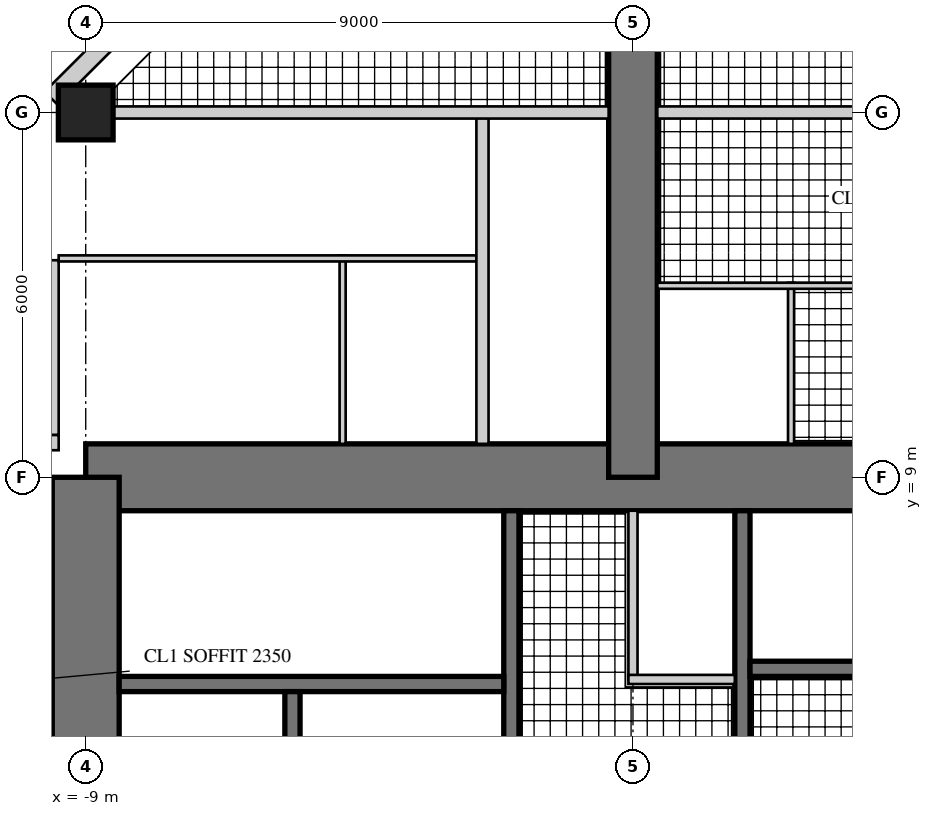
"""IFC4 building model, lengths in metres.
Left out: names, types, materials, properties, quantities, classifications, styles, units other than length and angle.
Written with IfcOpenShell. Run it as: python <this file> out.ifc"""

import sys

from ifc_helpers import new_model, si_unit, direction, frame, frame_2d, origin, origin_2d, place, context, subcontext, project, spatial, rectangle, hollow_rectangle, extrude, element, fill, save


model = new_model("IFC4")
c1 = context("Model", 3, precision=1e-05, world=origin(), true_north=direction((0.0, 1.0)))
c2 = subcontext(c1, "Body", "Model", "MODEL_VIEW")
j1 = project(units=[si_unit("LENGTHUNIT", "METRE"), si_unit("PLANEANGLEUNIT", "RADIAN")], contexts=[c1])
p1 = place(None, origin())
s1 = spatial("IfcSite", under=j1, at=p1, CompositionType="ELEMENT")
p2 = place(p1, origin())
s2 = spatial("IfcBuilding", under=s1, at=p2, CompositionType="ELEMENT")
p3 = place(p2, frame((0.0, 0.0, 179.7)))
s3 = spatial("IfcBuildingStorey", under=s2, at=p3, CompositionType="ELEMENT", Elevation=179.7)
p4 = place(p3, frame((9.0, 9.0, 0.0), z_axis=(0.0, 0.0, 1.0), x_axis=(-1.0, 0.0, 0.0)))
e1 = element("IfcWall", 1, at=p4, inside=s3, PredefinedType="SHEAR", context=c2, shape_type="SweptSolid", body=[
    extrude(rectangle(XDim=18.0, YDim=1.1, at=frame_2d((9.0, 0.0))), origin(), (0.0, 0.0, 1.0), 3.4),
])
p5 = place(p4, frame((9.8, 0.0, 0.0)))
e2 = element("IfcOpeningElement", 2, at=p5, cuts=e1, PredefinedType="OPENING", context=c2, shape_type="SweptSolid", body=[
    extrude(rectangle(XDim=1.0, YDim=2.4, at=frame_2d((0.5, 1.2))), frame((0.0, 0.56, 0.0), z_axis=(0.0, -1.0, 0.0), x_axis=(1.0, 0.0, 0.0)), (0.0, 0.0, 1.0), 1.12),
])
p6 = place(p3, frame((-9.0, 9.0, 0.0), z_axis=(0.0, 0.0, 1.0), x_axis=(0.0, -1.0, 0.0)))
e3 = element("IfcWall", 3, at=p6, inside=s3, PredefinedType="SHEAR", context=c2, shape_type="SweptSolid", body=[
    extrude(rectangle(XDim=18.0, YDim=1.1, at=frame_2d((9.0, 0.0))), origin(), (0.0, 0.0, 1.0), 3.4),
])
p7 = place(p6, frame((9.8, 0.0, 0.0)))
e4 = element("IfcOpeningElement", 4, at=p7, cuts=e3, PredefinedType="OPENING", context=c2, shape_type="SweptSolid", body=[
    extrude(rectangle(XDim=1.0, YDim=2.4, at=frame_2d((0.5, 1.2))), frame((0.0, 0.56, 0.0), z_axis=(0.0, -1.0, 0.0), x_axis=(1.0, 0.0, 0.0)), (0.0, 0.0, 1.0), 1.12),
])
p8 = place(p3, frame((1.8, 1.875, 0.0), z_axis=(0.0, 0.0, 1.0), x_axis=(0.0, 1.0, 0.0)))
e5 = element("IfcWall", 5, at=p8, inside=s3, PredefinedType="SHEAR", context=c2, shape_type="SweptSolid", body=[
    extrude(rectangle(XDim=6.575, YDim=0.25, at=frame_2d((3.288, 0.0))), origin(), (0.0, 0.0, 1.0), 3.4),
])
p9 = place(p8, frame((1.875, 0.0, 0.0)))
e6 = element("IfcOpeningElement", 6, at=p9, cuts=e5, PredefinedType="OPENING", context=c2, shape_type="SweptSolid", body=[
    extrude(rectangle(XDim=1.6, YDim=2.4, at=frame_2d((0.8, 1.2))), frame((0.0, 0.135, 0.0), z_axis=(0.0, -1.0, 0.0), x_axis=(1.0, 0.0, 0.0)), (0.0, 0.0, 1.0), 0.27),
])
p10 = place(p3, frame((1.925, 5.85, 0.0), z_axis=(0.0, 0.0, 1.0), x_axis=(1.0, 0.0, 0.0)))
e7 = element("IfcWall", 7, at=p10, inside=s3, PredefinedType="SHEAR", context=c2, shape_type="SweptSolid", body=[
    extrude(rectangle(XDim=6.525, YDim=0.25, at=frame_2d((3.262, 0.0))), origin(), (0.0, 0.0, 1.0), 3.4),
])
p11 = place(p10, frame((0.521, 0.0, 0.0)))
e8 = element("IfcOpeningElement", 8, at=p11, cuts=e7, PredefinedType="OPENING", context=c2, shape_type="SweptSolid", body=[
    extrude(rectangle(XDim=1.0, YDim=2.1, at=frame_2d((0.5, 1.05))), frame((0.0, 0.135, 0.0), z_axis=(0.0, -1.0, 0.0), x_axis=(1.0, 0.0, 0.0)), (0.0, 0.0, 1.0), 0.27),
])
p12 = place(p3, frame((-2.0, 1.675, 0.0), z_axis=(0.0, 0.0, 1.0), x_axis=(0.0, 1.0, 0.0)))
e9 = element("IfcWall", 9, at=p12, inside=s3, PredefinedType="SHEAR", context=c2, shape_type="SweptSolid", body=[
    extrude(rectangle(XDim=6.775, YDim=0.25, at=frame_2d((3.387, 0.0))), origin(), (0.0, 0.0, 1.0), 3.4),
])
p13 = place(p12, frame((0.725, 0.0, 0.0)))
e10 = element("IfcOpeningElement", 10, at=p13, cuts=e9, PredefinedType="OPENING", context=c2, shape_type="SweptSolid", body=[
    extrude(rectangle(XDim=1.0, YDim=2.1, at=frame_2d((0.5, 1.05))), frame((0.0, 0.135, 0.0), z_axis=(0.0, -1.0, 0.0), x_axis=(1.0, 0.0, 0.0)), (0.0, 0.0, 1.0), 0.27),
])
p14 = place(p3, frame((-2.125, 5.6, 0.0), z_axis=(0.0, 0.0, 1.0), x_axis=(-1.0, 0.0, 0.0)))
e11 = element("IfcWall", 11, at=p14, inside=s3, PredefinedType="SHEAR", context=c2, shape_type="SweptSolid", body=[
    extrude(rectangle(XDim=6.325, YDim=0.25, at=frame_2d((3.163, 0.0))), origin(), (0.0, 0.0, 1.0), 3.4),
])
p15 = place(p14, frame((0.175, 0.0, 0.0)))
e12 = element("IfcOpeningElement", 12, at=p15, cuts=e11, PredefinedType="OPENING", context=c2, shape_type="SweptSolid", body=[
    extrude(rectangle(XDim=1.0, YDim=2.1, at=frame_2d((0.5, 1.05))), frame((0.0, 0.135, 0.0), z_axis=(0.0, -1.0, 0.0), x_axis=(1.0, 0.0, 0.0)), (0.0, 0.0, 1.0), 0.27),
])
p16 = place(p3, frame((-5.6, 1.925, 0.0), z_axis=(0.0, 0.0, 1.0), x_axis=(0.0, 1.0, 0.0)))
e13 = element("IfcWall", 13, at=p16, inside=s3, PredefinedType="SHEAR", context=c2, shape_type="SweptSolid", body=[
    extrude(rectangle(XDim=3.55, YDim=0.25, at=frame_2d((1.775, 0.0))), origin(), (0.0, 0.0, 1.0), 3.4),
])
p17 = place(p16, frame((1.525, 0.0, 0.0)))
e14 = element("IfcOpeningElement", 14, at=p17, cuts=e13, PredefinedType="OPENING", context=c2, shape_type="SweptSolid", body=[
    extrude(rectangle(XDim=1.1, YDim=2.2, at=frame_2d((0.55, 1.1))), frame((0.0, 0.135, 0.0), z_axis=(0.0, -1.0, 0.0), x_axis=(1.0, 0.0, 0.0)), (0.0, 0.0, 1.0), 0.27),
])
p18 = place(p16, frame((0.075, 0.0, 0.0)))
e15 = element("IfcOpeningElement", 15, at=p18, cuts=e13, PredefinedType="OPENING", context=c2, shape_type="SweptSolid", body=[
    extrude(rectangle(XDim=0.8, YDim=2.1, at=frame_2d((0.4, 1.05))), frame((0.0, 0.135, 0.0), z_axis=(0.0, -1.0, 0.0), x_axis=(1.0, 0.0, 0.0)), (0.0, 0.0, 1.0), 0.27),
])
p19 = place(p3, frame((0.0, 9.0, 0.0), z_axis=(0.0, 0.0, 1.0), x_axis=(0.0, 1.0, 0.0)))
e16 = element("IfcWall", 16, at=p19, inside=s3, PredefinedType="SHEAR", context=c2, shape_type="SweptSolid", body=[
    extrude(rectangle(XDim=9.0, YDim=0.8, at=frame_2d((4.5, 0.0))), origin(), (0.0, 0.0, 1.0), 3.4),
])
p20 = place(p19, frame((3.95, 0.0, 0.0)))
e17 = element("IfcOpeningElement", 17, at=p20, cuts=e16, PredefinedType="OPENING", context=c2, shape_type="SweptSolid", body=[
    extrude(rectangle(XDim=1.0, YDim=2.15, at=frame_2d((0.5, 1.075))), frame((0.0, 0.41, 0.0), z_axis=(0.0, -1.0, 0.0), x_axis=(1.0, 0.0, 0.0)), (0.0, 0.0, 1.0), 0.82),
])
p21 = place(p19, frame((7.0, 0.0, 0.0)))
e18 = element("IfcOpeningElement", 18, at=p21, cuts=e16, PredefinedType="OPENING", context=c2, shape_type="SweptSolid", body=[
    extrude(rectangle(XDim=1.0, YDim=2.2, at=frame_2d((0.5, 1.1))), frame((0.0, 0.41, 0.0), z_axis=(0.0, -1.0, 0.0), x_axis=(1.0, 0.0, 0.0)), (0.0, 0.0, 1.0), 0.82),
])
p22 = place(p3, frame((-9.0, 15.0, 0.0), z_axis=(0.0, 0.0, 1.0), x_axis=(1.0, 0.0, 0.0)))
e19 = element("IfcColumn", 19, at=p22, inside=s3, PredefinedType="COLUMN", context=c2, shape_type="SweptSolid", body=[
    extrude(rectangle(XDim=0.9, YDim=0.9, at=origin_2d()), origin(), (0.0, 0.0, 1.0), 3.4),
])
p23 = place(p3, frame((-6.406, 18.4, 0.0), z_axis=(0.0, 0.0, 1.0), x_axis=(-0.707134062067, -0.707079499254, 0.0)))
e20 = element("IfcWall", 20, at=p23, inside=s3, PredefinedType="SOLIDWALL", context=c2, shape_type="SweptSolid", body=[
    extrude(rectangle(XDim=4.475, YDim=0.3, at=frame_2d((2.237, 0.0))), origin(), (0.0, 0.0, 1.0), 3.22),
])
p24 = place(p23, frame((1.787, 0.0, 0.3)))
e21 = element("IfcOpeningElement", 21, at=p24, cuts=e20, PredefinedType="OPENING", context=c2, shape_type="SweptSolid", body=[
    extrude(rectangle(XDim=0.9, YDim=2.4, at=frame_2d((0.45, 1.2))), frame((0.0, 0.16, 0.0), z_axis=(0.0, -1.0, 0.0), x_axis=(1.0, 0.0, 0.0)), (0.0, 0.0, 1.0), 0.32),
])
p25 = place(p3, frame((-9.57, 12.57, 0.0), z_axis=(0.0, 0.0, 1.0), x_axis=(0.0, -1.0, 0.0)))
e22 = element("IfcWall", 22, at=p25, inside=s3, PredefinedType="SOLIDWALL", context=c2, shape_type="SweptSolid", body=[
    extrude(rectangle(XDim=2.875, YDim=0.25, at=frame_2d((1.438, 0.0))), origin(), (0.0, 0.0, 1.0), 3.22),
])
p26 = place(p25, frame((0.6, 0.0, 0.0)))
e23 = element("IfcOpeningElement", 23, at=p26, cuts=e22, PredefinedType="OPENING", context=c2, shape_type="SweptSolid", body=[
    extrude(rectangle(XDim=1.0, YDim=2.2, at=frame_2d((0.5, 1.1))), frame((0.0, 0.135, 0.0), z_axis=(0.0, -1.0, 0.0), x_axis=(1.0, 0.0, 0.0)), (0.0, 0.0, 1.0), 0.27),
])
p27 = place(p3, frame((-9.445, 9.57, 0.0), z_axis=(0.0, 0.0, 1.0), x_axis=(-1.0, 0.0, 0.0)))
e24 = element("IfcWall", 24, at=p27, inside=s3, PredefinedType="SOLIDWALL", context=c2, shape_type="SweptSolid", body=[
    extrude(rectangle(XDim=3.125, YDim=0.25, at=frame_2d((1.562, 0.0))), origin(), (0.0, 0.0, 1.0), 3.22),
])
p28 = place(p27, frame((0.6, 0.0, 0.0)))
e25 = element("IfcOpeningElement", 25, at=p28, cuts=e24, PredefinedType="OPENING", context=c2, shape_type="SweptSolid", body=[
    extrude(rectangle(XDim=1.0, YDim=2.2, at=frame_2d((0.5, 1.1))), frame((0.0, 0.135, 0.0), z_axis=(0.0, -1.0, 0.0), x_axis=(1.0, 0.0, 0.0)), (0.0, 0.0, 1.0), 0.27),
])
p29 = place(p3, frame((0.0, 5.675, 0.0), z_axis=(0.0, 0.0, 1.0), x_axis=(0.0, 1.0, 0.0)))
e26 = element("IfcWall", 26, at=p29, inside=s3, PredefinedType="PARTITIONING", context=c2, shape_type="SweptSolid", body=[
    extrude(rectangle(XDim=2.775, YDim=0.15, at=frame_2d((1.387, 0.0))), origin(), (0.0, 0.0, 1.0), 3.22),
])
p30 = place(p29, frame((0.4, 0.0, 0.0)))
e27 = element("IfcOpeningElement", 27, at=p30, cuts=e26, PredefinedType="OPENING", context=c2, shape_type="SweptSolid", body=[
    extrude(rectangle(XDim=1.0, YDim=2.1, at=frame_2d((0.5, 1.05))), frame((0.0, 0.085, 0.0), z_axis=(0.0, -1.0, 0.0), x_axis=(1.0, 0.0, 0.0)), (0.0, 0.0, 1.0), 0.17),
])
p31 = place(p3, frame((1.675, 5.675, 0.0), z_axis=(0.0, 0.0, 1.0), x_axis=(-1.0, 0.0, 0.0)))
e28 = element("IfcWall", 28, at=p31, inside=s3, PredefinedType="PARTITIONING", context=c2, shape_type="SweptSolid", body=[
    extrude(rectangle(XDim=1.75, YDim=0.15, at=frame_2d((0.875, 0.0))), origin(), (0.0, 0.0, 1.0), 3.22),
])
p32 = place(p3, frame((-4.775, 9.55, 0.0), z_axis=(0.0, 0.0, 1.0), x_axis=(0.0, 1.0, 0.0)))
e29 = element("IfcWall", 29, at=p32, inside=s3, PredefinedType="PARTITIONING", context=c2, shape_type="SweptSolid", body=[
    extrude(rectangle(XDim=3.1, YDim=0.1, at=frame_2d((1.55, 0.0))), origin(), (0.0, 0.0, 1.0), 3.22),
])
p33 = place(p3, frame((-2.575, 12.6, 0.0), z_axis=(0.0, 0.0, 1.0), x_axis=(-1.0, 0.0, 0.0)))
e30 = element("IfcWall", 30, at=p33, inside=s3, PredefinedType="PARTITIONING", context=c2, shape_type="SweptSolid", body=[
    extrude(rectangle(XDim=6.87, YDim=0.1, at=frame_2d((3.435, 0.0))), origin(), (0.0, 0.0, 1.0), 3.22),
])
p34 = place(p33, frame((0.55, 0.0, 0.0)))
e31 = element("IfcOpeningElement", 31, at=p34, cuts=e30, PredefinedType="OPENING", context=c2, shape_type="SweptSolid", body=[
    extrude(rectangle(XDim=0.9, YDim=2.1, at=frame_2d((0.45, 1.05))), frame((0.0, 0.06, 0.0), z_axis=(0.0, -1.0, 0.0), x_axis=(1.0, 0.0, 0.0)), (0.0, 0.0, 1.0), 0.12),
])
p35 = place(p33, frame((2.65, 0.0, 0.0)))
e32 = element("IfcOpeningElement", 32, at=p35, cuts=e30, PredefinedType="OPENING", context=c2, shape_type="SweptSolid", body=[
    extrude(rectangle(XDim=0.9, YDim=2.1, at=frame_2d((0.45, 1.05))), frame((0.0, 0.06, 0.0), z_axis=(0.0, -1.0, 0.0), x_axis=(1.0, 0.0, 0.0)), (0.0, 0.0, 1.0), 0.12),
])
p36 = place(p3, frame((2.6, 9.55, 0.0), z_axis=(0.0, 0.0, 1.0), x_axis=(0.0, 1.0, 0.0)))
e33 = element("IfcWall", 33, at=p36, inside=s3, PredefinedType="PARTITIONING", context=c2, shape_type="SweptSolid", body=[
    extrude(rectangle(XDim=2.65, YDim=0.1, at=frame_2d((1.325, 0.0))), origin(), (0.0, 0.0, 1.0), 3.22),
])
p37 = place(p3, frame((9.445, 12.15, 0.0), z_axis=(0.0, 0.0, 1.0), x_axis=(-1.0, 0.0, 0.0)))
e34 = element("IfcWall", 34, at=p37, inside=s3, PredefinedType="PARTITIONING", context=c2, shape_type="SweptSolid", body=[
    extrude(rectangle(XDim=9.045, YDim=0.1, at=frame_2d((4.522, 0.0))), origin(), (0.0, 0.0, 1.0), 3.22),
])
p38 = place(p37, frame((5.495, 0.0, 0.0)))
e35 = element("IfcOpeningElement", 35, at=p38, cuts=e34, PredefinedType="OPENING", context=c2, shape_type="SweptSolid", body=[
    extrude(rectangle(XDim=0.9, YDim=2.1, at=frame_2d((0.45, 1.05))), frame((0.0, 0.06, 0.0), z_axis=(0.0, -1.0, 0.0), x_axis=(1.0, 0.0, 0.0)), (0.0, 0.0, 1.0), 0.12),
])
p39 = place(p37, frame((7.595, 0.0, 0.0)))
e36 = element("IfcOpeningElement", 36, at=p39, cuts=e34, PredefinedType="OPENING", context=c2, shape_type="SweptSolid", body=[
    extrude(rectangle(XDim=0.9, YDim=2.1, at=frame_2d((0.45, 1.05))), frame((0.0, 0.06, 0.0), z_axis=(0.0, -1.0, 0.0), x_axis=(1.0, 0.0, 0.0)), (0.0, 0.0, 1.0), 0.12),
])
p40 = place(p3, frame((-2.475, 9.55, 0.0), z_axis=(0.0, 0.0, 1.0), x_axis=(0.0, 1.0, 0.0)))
e37 = element("IfcWall", 37, at=p40, inside=s3, PredefinedType="SOLIDWALL", context=c2, shape_type="SweptSolid", body=[
    extrude(rectangle(XDim=5.45, YDim=0.2, at=frame_2d((2.725, 0.0))), origin(), (0.0, 0.0, 1.0), 3.22),
])
p41 = place(p40, frame((3.6, 0.0, 0.0)))
e38 = element("IfcOpeningElement", 38, at=p41, cuts=e37, PredefinedType="OPENING", context=c2, shape_type="SweptSolid", body=[
    extrude(rectangle(XDim=1.0, YDim=2.15, at=frame_2d((0.5, 1.075))), frame((0.0, 0.11, 0.0), z_axis=(0.0, -1.0, 0.0), x_axis=(1.0, 0.0, 0.0)), (0.0, 0.0, 1.0), 0.22),
])
p42 = place(p3, frame((8.55, 15.0, 0.0), z_axis=(0.0, 0.0, 1.0), x_axis=(-1.0, 0.0, 0.0)))
e39 = element("IfcWall", 39, at=p42, inside=s3, PredefinedType="SOLIDWALL", context=c2, shape_type="SweptSolid", body=[
    extrude(rectangle(XDim=8.15, YDim=0.2, at=frame_2d((4.075, 0.0))), origin(), (0.0, 0.0, 1.0), 2.47),
])
p43 = place(p3, frame((-0.4, 15.0, 0.0), z_axis=(0.0, 0.0, 1.0), x_axis=(-1.0, 0.0, 0.0)))
e40 = element("IfcWall", 40, at=p43, inside=s3, PredefinedType="SOLIDWALL", context=c2, shape_type="SweptSolid", body=[
    extrude(rectangle(XDim=8.15, YDim=0.2, at=frame_2d((4.075, 0.0))), origin(), (0.0, 0.0, 1.0), 2.47),
])
p44 = place(p43, frame((0.4, 0.0, 0.0)))
e41 = element("IfcOpeningElement", 41, at=p44, cuts=e40, PredefinedType="OPENING", context=c2, shape_type="SweptSolid", body=[
    extrude(rectangle(XDim=1.0, YDim=2.2, at=frame_2d((0.5, 1.1))), frame((0.0, 0.11, 0.0), z_axis=(0.0, -1.0, 0.0), x_axis=(1.0, 0.0, 0.0)), (0.0, 0.0, 1.0), 0.22),
])
p45 = place(p26, origin())
e42 = element("IfcDoor", 42, at=p45, inside=s3, OperationType="SINGLE_SWING_LEFT", PredefinedType="DOOR", context=c2, shape_type="SweptSolid", body=[
    extrude(hollow_rectangle(XDim=1.0, YDim=2.2, WallThickness=0.06, at=frame_2d((0.5, 1.1))), frame((0.0, 0.025, 0.0), z_axis=(0.0, -1.0, 0.0), x_axis=(1.0, 0.0, 0.0)), (0.0, 0.0, 1.0), 0.05),
    extrude(rectangle(XDim=0.879, YDim=2.079, at=frame_2d((0.5, 1.1))), frame((0.0, 0.025, 0.0), z_axis=(0.0, -1.0, 0.0), x_axis=(1.0, 0.0, 0.0)), (0.0, 0.0, 1.0), 0.05),
])
fill(e23, e42)
p46 = place(p30, frame((1.0, 0.0, 0.0), z_axis=(0.0, 0.0, 1.0), x_axis=(-1.0, 0.0, 0.0)))
e43 = element("IfcDoor", 43, at=p46, inside=s3, OperationType="SINGLE_SWING_RIGHT", PredefinedType="DOOR", context=c2, shape_type="SweptSolid", body=[
    extrude(rectangle(XDim=1.0, YDim=2.1, at=frame_2d((0.5, 1.05))), frame((0.0, 0.025, 0.0), z_axis=(0.0, -1.0, 0.0), x_axis=(1.0, 0.0, 0.0)), (0.0, 0.0, 1.0), 0.05),
])
fill(e27, e43)
p47 = place(p34, origin())
e44 = element("IfcDoor", 44, at=p47, inside=s3, OperationType="SINGLE_SWING_LEFT", PredefinedType="DOOR", context=c2, shape_type="SweptSolid", body=[
    extrude(rectangle(XDim=0.9, YDim=2.1, at=frame_2d((0.45, 1.05))), frame((0.0, 0.025, 0.0), z_axis=(0.0, -1.0, 0.0), x_axis=(1.0, 0.0, 0.0)), (0.0, 0.0, 1.0), 0.05),
])
fill(e31, e44)
p48 = place(p35, origin())
e45 = element("IfcDoor", 45, at=p48, inside=s3, OperationType="SINGLE_SWING_LEFT", PredefinedType="DOOR", context=c2, shape_type="SweptSolid", body=[
    extrude(rectangle(XDim=0.9, YDim=2.1, at=frame_2d((0.45, 1.05))), frame((0.0, 0.025, 0.0), z_axis=(0.0, -1.0, 0.0), x_axis=(1.0, 0.0, 0.0)), (0.0, 0.0, 1.0), 0.05),
])
fill(e32, e45)
p49 = place(p38, origin())
e46 = element("IfcDoor", 46, at=p49, inside=s3, OperationType="SINGLE_SWING_RIGHT", PredefinedType="DOOR", context=c2, shape_type="SweptSolid", body=[
    extrude(rectangle(XDim=0.9, YDim=2.1, at=frame_2d((0.45, 1.05))), frame((0.0, 0.025, 0.0), z_axis=(0.0, -1.0, 0.0), x_axis=(1.0, 0.0, 0.0)), (0.0, 0.0, 1.0), 0.05),
])
fill(e35, e46)
p50 = place(p39, origin())
e47 = element("IfcDoor", 47, at=p50, inside=s3, OperationType="SINGLE_SWING_RIGHT", PredefinedType="DOOR", context=c2, shape_type="SweptSolid", body=[
    extrude(rectangle(XDim=0.9, YDim=2.1, at=frame_2d((0.45, 1.05))), frame((0.0, 0.025, 0.0), z_axis=(0.0, -1.0, 0.0), x_axis=(1.0, 0.0, 0.0)), (0.0, 0.0, 1.0), 0.05),
])
fill(e36, e47)
p51 = place(p41, origin())
e48 = element("IfcDoor", 48, at=p51, inside=s3, OperationType="SINGLE_SWING_LEFT", PredefinedType="DOOR", context=c2, shape_type="SweptSolid", body=[
    extrude(rectangle(XDim=1.0, YDim=2.15, at=frame_2d((0.5, 1.075))), frame((0.0, 0.025, 0.0), z_axis=(0.0, -1.0, 0.0), x_axis=(1.0, 0.0, 0.0)), (0.0, 0.0, 1.0), 0.05),
])
fill(e38, e48)
p52 = place(p44, frame((1.0, 0.0, 0.0), z_axis=(0.0, 0.0, 1.0), x_axis=(-1.0, 0.0, 0.0)))
e49 = element("IfcDoor", 49, at=p52, inside=s3, OperationType="SINGLE_SWING_RIGHT", PredefinedType="DOOR", context=c2, shape_type="SweptSolid", body=[
    extrude(rectangle(XDim=1.0, YDim=2.2, at=frame_2d((0.5, 1.1))), frame((0.0, 0.025, 0.0), z_axis=(0.0, -1.0, 0.0), x_axis=(1.0, 0.0, 0.0)), (0.0, 0.0, 1.0), 0.05),
])
fill(e41, e49)
p53 = place(p20, frame((1.0, 0.0, 0.0), z_axis=(0.0, 0.0, 1.0), x_axis=(-1.0, 0.0, 0.0)))
e50 = element("IfcDoor", 50, at=p53, inside=s3, OperationType="SINGLE_SWING_RIGHT", PredefinedType="DOOR", context=c2, shape_type="SweptSolid", body=[
    extrude(rectangle(XDim=1.0, YDim=2.15, at=frame_2d((0.5, 1.075))), frame((0.0, 0.025, 0.0), z_axis=(0.0, -1.0, 0.0), x_axis=(1.0, 0.0, 0.0)), (0.0, 0.0, 1.0), 0.05),
])
fill(e17, e50)
p54 = place(p5, origin())
e51 = element("IfcDoor", 51, at=p54, inside=s3, OperationType="SINGLE_SWING_RIGHT", PredefinedType="DOOR", context=c2, shape_type="SweptSolid", body=[
    extrude(rectangle(XDim=1.0, YDim=2.4, at=frame_2d((0.5, 1.2))), frame((0.0, 0.055, 0.0), z_axis=(0.0, -1.0, 0.0), x_axis=(1.0, 0.0, 0.0)), (0.0, 0.0, 1.0), 0.05),
])
fill(e2, e51)
p55 = place(p9, frame((1.6, 0.0, 0.0), z_axis=(0.0, 0.0, 1.0), x_axis=(-1.0, 0.0, 0.0)))
e52 = element("IfcDoor", 52, at=p55, inside=s3, OperationType="DOUBLE_DOOR_SINGLE_SWING", PredefinedType="DOOR", context=c2, shape_type="SweptSolid", body=[
    extrude(rectangle(XDim=1.6, YDim=2.4, at=frame_2d((0.8, 1.2))), frame((0.0, 0.025, 0.0), z_axis=(0.0, -1.0, 0.0), x_axis=(1.0, 0.0, 0.0)), (0.0, 0.0, 1.0), 0.05),
])
fill(e6, e52)
p56 = place(p15, frame((1.0, 0.0, 0.0), z_axis=(0.0, 0.0, 1.0), x_axis=(-1.0, 0.0, 0.0)))
e53 = element("IfcDoor", 53, at=p56, inside=s3, OperationType="SINGLE_SWING_RIGHT", PredefinedType="DOOR", context=c2, shape_type="SweptSolid", body=[
    extrude(rectangle(XDim=1.0, YDim=2.1, at=frame_2d((0.5, 1.05))), frame((0.0, 0.025, 0.0), z_axis=(0.0, -1.0, 0.0), x_axis=(1.0, 0.0, 0.0)), (0.0, 0.0, 1.0), 0.05),
])
fill(e12, e53)
p57 = place(p11, origin())
e54 = element("IfcDoor", 54, at=p57, inside=s3, OperationType="SINGLE_SWING_LEFT", PredefinedType="DOOR", context=c2, shape_type="SweptSolid", body=[
    extrude(rectangle(XDim=1.0, YDim=2.1, at=frame_2d((0.5, 1.05))), frame((0.0, 0.025, 0.0), z_axis=(0.0, -1.0, 0.0), x_axis=(1.0, 0.0, 0.0)), (0.0, 0.0, 1.0), 0.05),
])
fill(e8, e54)
save(model, sys.argv[1])
